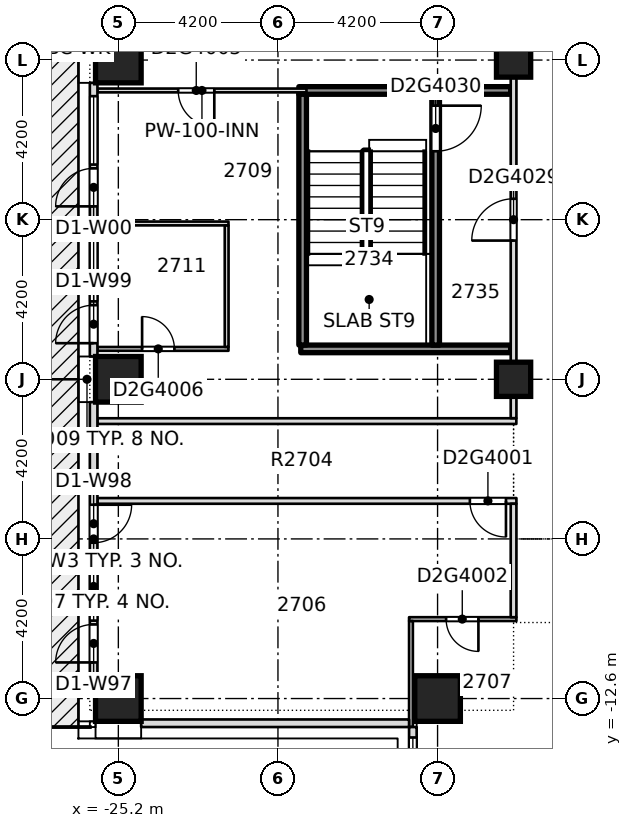
"""IFC4 building model, lengths in metres.
Left out: names, types, materials, properties, quantities, classifications, styles, units other than length and angle.
Written with IfcOpenShell. Run it as: python <this file> out.ifc"""

import sys

from ifc_helpers import new_model, si_unit, direction, frame, frame_2d, origin, origin_2d, place, context, subcontext, project, spatial, rectangle, extrude, element, fill, save


model = new_model("IFC4")
c1 = context("Model", 3, precision=1e-05, world=origin(), true_north=direction((0.0, 1.0)))
c2 = subcontext(c1, "Body", "Model", "MODEL_VIEW")
j1 = project(units=[si_unit("LENGTHUNIT", "METRE"), si_unit("PLANEANGLEUNIT", "RADIAN")], contexts=[c1])
p1 = place(None, origin())
s1 = spatial("IfcSite", under=j1, at=p1, CompositionType="ELEMENT")
p2 = place(p1, origin())
s2 = spatial("IfcBuilding", under=s1, at=p2, CompositionType="ELEMENT")
p3 = place(p2, frame((0.0, 0.0, 108.0)))
s3 = spatial("IfcBuildingStorey", under=s2, at=p3, CompositionType="ELEMENT", Elevation=108.0)
for number, where, z_axis, x_axis in (
    (1, (-25.2, -12.6, -0.32), (0.0, 0.0, 1.0), (1.0, 0.0, 0.0)),
    (2, (-16.8, -12.6, -0.32), (0.0, 0.0, 1.0), (1.0, 0.0, 0.0)),
    (3, (-25.2, -4.2, -0.32), (0.0, 0.0, 1.0), (1.0, 0.0, 0.0)),
    (4, (-25.2, 4.2, -0.32), (0.0, 0.0, 1.0), (1.0, 0.0, 0.0)),
):
    element("IfcColumn", number, at=place(p3, frame(where, z_axis=z_axis, x_axis=x_axis)), inside=s3, PredefinedType="COLUMN", context=c2, shape_type="SweptSolid", body=[
        extrude(rectangle(XDim=1.2, YDim=1.2, at=origin_2d()), origin(), (0.0, 0.0, 1.0), 3.45),
    ])
for number, where, z_axis, x_axis in (
    (5, (-14.8, -4.2, -0.32), (0.0, 0.0, 1.0), (1.0, 0.0, 0.0)),
    (6, (-14.8, 4.2, -0.32), (0.0, 0.0, 1.0), (1.0, 0.0, 0.0)),
):
    element("IfcColumn", number, at=place(p3, frame(where, z_axis=z_axis, x_axis=x_axis)), inside=s3, PredefinedType="COLUMN", context=c2, shape_type="SweptSolid", body=[
        extrude(rectangle(XDim=0.9, YDim=0.9, at=origin_2d()), origin(), (0.0, 0.0, 1.0), 3.45),
    ])
p4 = place(p3, frame((-17.55, -10.51, 0.0), z_axis=(0.0, 0.0, 1.0), x_axis=(1.0, 0.0, 0.0)))
e7 = element("IfcWall", 7, at=p4, inside=s3, PredefinedType="PARTITIONING", context=c2, shape_type="SweptSolid", body=[
    extrude(rectangle(XDim=2.825, YDim=0.1, at=frame_2d((1.413, 0.0))), origin(), (0.0, 0.0, 1.0), 3.13),
])
p5 = place(p4, frame((0.975, 0.0, 0.0)))
e8 = element("IfcOpeningElement", 8, at=p5, cuts=e7, PredefinedType="OPENING", context=c2, shape_type="SweptSolid", body=[
    extrude(rectangle(XDim=0.85, YDim=2.1, at=frame_2d((0.425, 1.05))), frame((0.0, 0.06, 0.0), z_axis=(0.0, -1.0, 0.0), x_axis=(1.0, 0.0, 0.0)), (0.0, 0.0, 1.0), 0.12),
])
p6 = place(p3, frame((-25.75, -7.4, 0.0), z_axis=(0.0, 0.0, 1.0), x_axis=(1.0, 0.0, 0.0)))
e9 = element("IfcWall", 9, at=p6, inside=s3, PredefinedType="PARTITIONING", context=c2, shape_type="SweptSolid", body=[
    extrude(rectangle(XDim=11.025, YDim=0.15, at=frame_2d((5.512, 0.0))), origin(), (0.0, 0.0, 1.0), 3.13),
])
p7 = place(p6, frame((9.8, 0.0, 0.0)))
e10 = element("IfcOpeningElement", 10, at=p7, cuts=e9, PredefinedType="OPENING", context=c2, shape_type="SweptSolid", body=[
    extrude(rectangle(XDim=0.95, YDim=2.1, at=frame_2d((0.475, 1.05))), frame((0.0, 0.085, 0.0), z_axis=(0.0, -1.0, 0.0), x_axis=(1.0, 0.0, 0.0)), (0.0, 0.0, 1.0), 0.17),
])
p8 = place(p3, frame((-25.75, -5.3, 0.0), z_axis=(0.0, 0.0, 1.0), x_axis=(1.0, 0.0, 0.0)))
e11 = element("IfcWall", 11, at=p8, inside=s3, PredefinedType="PARTITIONING", context=c2, shape_type="SweptSolid", body=[
    extrude(rectangle(XDim=11.023, YDim=0.15, at=frame_2d((5.511, 0.0))), origin(), (0.0, 0.0, 1.0), 3.13),
])
p9 = place(p3, frame((-25.75, -3.4, 0.0), z_axis=(0.0, 0.0, 1.0), x_axis=(1.0, 0.0, 0.0)))
e12 = element("IfcWall", 12, at=p9, inside=s3, PredefinedType="PARTITIONING", context=c2, shape_type="SweptSolid", body=[
    extrude(rectangle(XDim=3.448, YDim=0.1, at=frame_2d((1.724, 0.0))), origin(), (0.0, 0.0, 1.0), 3.13),
])
p10 = place(p9, frame((1.175, 0.0, 0.0)))
e13 = element("IfcOpeningElement", 13, at=p10, cuts=e12, PredefinedType="OPENING", context=c2, shape_type="SweptSolid", body=[
    extrude(rectangle(XDim=0.85, YDim=2.1, at=frame_2d((0.425, 1.05))), frame((0.0, 0.06, 0.0), z_axis=(0.0, -1.0, 0.0), x_axis=(1.0, 0.0, 0.0)), (0.0, 0.0, 1.0), 0.12),
])
p11 = place(p3, frame((-20.4, -3.4, 0.0), z_axis=(0.0, 0.0, 1.0), x_axis=(1.0, 0.0, 0.0)))
e14 = element("IfcWall", 14, at=p11, inside=s3, PredefinedType="SOLIDWALL", context=c2, shape_type="SweptSolid", body=[
    extrude(rectangle(XDim=5.523, YDim=0.2, at=frame_2d((2.761, 0.0))), origin(), (0.0, 0.0, 1.0), 3.13),
])
p12 = place(p3, frame((-25.75, -0.1, 0.0), z_axis=(0.0, 0.0, 1.0), x_axis=(1.0, 0.0, 0.0)))
e15 = element("IfcWall", 15, at=p12, inside=s3, PredefinedType="PARTITIONING", context=c2, shape_type="SweptSolid", body=[
    extrude(rectangle(XDim=3.448, YDim=0.1, at=frame_2d((1.724, 0.0))), origin(), (0.0, 0.0, 1.0), 3.13),
])
p13 = place(p3, frame((-25.75, 3.4, 0.0), z_axis=(0.0, 0.0, 1.0), x_axis=(1.0, 0.0, 0.0)))
e16 = element("IfcWall", 16, at=p13, inside=s3, PredefinedType="PARTITIONING", context=c2, shape_type="SweptSolid", body=[
    extrude(rectangle(XDim=5.5, YDim=0.1, at=frame_2d((2.75, 0.0))), origin(), (0.0, 0.0, 1.0), 3.13),
])
p14 = place(p13, frame((2.125, 0.0, 0.0)))
e17 = element("IfcOpeningElement", 17, at=p14, cuts=e16, PredefinedType="OPENING", context=c2, shape_type="SweptSolid", body=[
    extrude(rectangle(XDim=0.95, YDim=2.1, at=frame_2d((0.475, 1.05))), frame((0.0, 0.06, 0.0), z_axis=(0.0, -1.0, 0.0), x_axis=(1.0, 0.0, 0.0)), (0.0, 0.0, 1.0), 0.12),
])
p15 = place(p3, frame((-20.45, 3.4, 0.0), z_axis=(0.0, 0.0, 1.0), x_axis=(1.0, 0.0, 0.0)))
e18 = element("IfcWall", 18, at=p15, inside=s3, PredefinedType="SOLIDWALL", context=c2, shape_type="SweptSolid", body=[
    extrude(rectangle(XDim=5.575, YDim=0.2, at=frame_2d((2.788, 0.0))), origin(), (0.0, 0.0, 1.0), 3.13),
])
p16 = place(p3, frame((-22.35, -3.348, 0.0), z_axis=(0.0, 0.0, 1.0), x_axis=(0.0, 1.0, 0.0)))
e19 = element("IfcWall", 19, at=p16, inside=s3, PredefinedType="PARTITIONING", context=c2, shape_type="SweptSolid", body=[
    extrude(rectangle(XDim=3.196, YDim=0.1, at=frame_2d((1.598, 0.0))), origin(), (0.0, 0.0, 1.0), 3.13),
])
p17 = place(p3, frame((-17.5, -13.35, 0.0), z_axis=(0.0, 0.0, 1.0), x_axis=(0.0, 1.0, 0.0)))
e20 = element("IfcWall", 20, at=p17, inside=s3, PredefinedType="PARTITIONING", context=c2, shape_type="SweptSolid", body=[
    extrude(rectangle(XDim=2.79, YDim=0.1, at=frame_2d((1.395, 0.0))), origin(), (0.0, 0.0, 1.0), 3.13),
])
p18 = place(p3, frame((-16.85, -3.3, 0.0), z_axis=(0.0, 0.0, 1.0), x_axis=(0.0, 1.0, 0.0)))
e21 = element("IfcWall", 21, at=p18, inside=s3, PredefinedType="SOLIDWALL", context=c2, shape_type="SweptSolid", body=[
    extrude(rectangle(XDim=6.6, YDim=0.2, at=frame_2d((3.3, 0.0))), origin(), (0.0, 0.0, 1.0), 3.13),
])
p19 = place(p18, frame((5.1, 0.0, 0.0)))
e22 = element("IfcOpeningElement", 22, at=p19, cuts=e21, PredefinedType="OPENING", context=c2, shape_type="SweptSolid", body=[
    extrude(rectangle(XDim=1.2, YDim=2.1, at=frame_2d((0.6, 1.05))), frame((0.0, 0.11, 0.0), z_axis=(0.0, -1.0, 0.0), x_axis=(1.0, 0.0, 0.0)), (0.0, 0.0, 1.0), 0.22),
])
p20 = place(p3, frame((-14.8, -10.46, 0.0), z_axis=(0.0, 0.0, 1.0), x_axis=(0.0, 1.0, 0.0)))
e23 = element("IfcWall", 23, at=p20, inside=s3, PredefinedType="PARTITIONING", context=c2, shape_type="SweptSolid", body=[
    extrude(rectangle(XDim=2.985, YDim=0.15, at=frame_2d((1.492, 0.0))), origin(), (0.0, 0.0, 1.0), 3.13),
])
p21 = place(p3, frame((-14.8, -5.223, 0.0), z_axis=(0.0, 0.0, 1.0), x_axis=(0.0, 1.0, 0.0)))
e24 = element("IfcWall", 24, at=p21, inside=s3, PredefinedType="PARTITIONING", context=c2, shape_type="SweptSolid", body=[
    extrude(rectangle(XDim=18.523, YDim=0.15, at=frame_2d((9.261, 0.0))), origin(), (0.0, 0.0, 1.0), 3.13),
])
p22 = place(p21, frame((13.098, 0.0, 0.0)))
e25 = element("IfcOpeningElement", 25, at=p22, cuts=e24, PredefinedType="OPENING", context=c2, shape_type="SweptSolid", body=[
    extrude(rectangle(XDim=1.0, YDim=2.1, at=frame_2d((0.5, 1.05))), frame((0.0, 0.085, 0.0), z_axis=(0.0, -1.0, 0.0), x_axis=(1.0, 0.0, 0.0)), (0.0, 0.0, 1.0), 0.17),
])
p23 = place(p21, frame((4.673, 0.0, 0.0)))
e26 = element("IfcOpeningElement", 26, at=p23, cuts=e24, PredefinedType="OPENING", context=c2, shape_type="SweptSolid", body=[
    extrude(rectangle(XDim=1.1, YDim=2.1, at=frame_2d((0.55, 1.05))), frame((0.0, 0.085, 0.0), z_axis=(0.0, -1.0, 0.0), x_axis=(1.0, 0.0, 0.0)), (0.0, 0.0, 1.0), 0.17),
])
p24 = place(p3, frame((-25.85, 3.6, 0.0), z_axis=(0.0, 0.0, 1.0), x_axis=(0.0, -1.0, 0.0)))
e27 = element("IfcWall", 27, at=p24, inside=s3, PredefinedType="STANDARD", context=c2, shape_type="SweptSolid", body=[
    extrude(rectangle(XDim=7.2, YDim=0.2, at=frame_2d((3.6, 0.0))), origin(), (0.0, 0.0, 1.0), 3.13),
])
p25 = place(p24, frame((3.95, 0.0, 0.2)))
e28 = element("IfcOpeningElement", 28, at=p25, cuts=e27, PredefinedType="OPENING", context=c2, shape_type="SweptSolid", body=[
    extrude(rectangle(XDim=1.8, YDim=2.65, at=frame_2d((0.9, 1.325))), frame((0.0, 0.11, 0.0), z_axis=(0.0, -1.0, 0.0), x_axis=(1.0, 0.0, 0.0)), (0.0, 0.0, 1.0), 0.22),
])
p26 = place(p24, frame((5.85, 0.0, 0.0)))
e29 = element("IfcOpeningElement", 29, at=p26, cuts=e27, PredefinedType="OPENING", context=c2, shape_type="SweptSolid", body=[
    extrude(rectangle(XDim=1.0, YDim=2.4, at=frame_2d((0.5, 1.2))), frame((0.0, 0.11, 0.0), z_axis=(0.0, -1.0, 0.0), x_axis=(1.0, 0.0, 0.0)), (0.0, 0.0, 1.0), 0.22),
])
p27 = place(p24, frame((0.35, 0.0, 0.2)))
e30 = element("IfcOpeningElement", 30, at=p27, cuts=e27, PredefinedType="OPENING", context=c2, shape_type="SweptSolid", body=[
    extrude(rectangle(XDim=1.8, YDim=2.65, at=frame_2d((0.9, 1.325))), frame((0.0, 0.11, 0.0), z_axis=(0.0, -1.0, 0.0), x_axis=(1.0, 0.0, 0.0)), (0.0, 0.0, 1.0), 0.22),
])
p28 = place(p24, frame((2.25, 0.0, 0.0)))
e31 = element("IfcOpeningElement", 31, at=p28, cuts=e27, PredefinedType="OPENING", context=c2, shape_type="SweptSolid", body=[
    extrude(rectangle(XDim=1.0, YDim=2.4, at=frame_2d((0.5, 1.2))), frame((0.0, 0.11, 0.0), z_axis=(0.0, -1.0, 0.0), x_axis=(1.0, 0.0, 0.0)), (0.0, 0.0, 1.0), 0.22),
])
p29 = place(p3, frame((-25.85, -4.8, 0.0), z_axis=(0.0, 0.0, 1.0), x_axis=(0.0, -1.0, 0.0)))
e32 = element("IfcWall", 32, at=p29, inside=s3, PredefinedType="STANDARD", context=c2, shape_type="SweptSolid", body=[
    extrude(rectangle(XDim=7.2, YDim=0.2, at=frame_2d((3.6, 0.0))), origin(), (0.0, 0.0, 1.0), 3.13),
])
p30 = place(p29, frame((3.95, 0.0, 0.2)))
e33 = element("IfcOpeningElement", 33, at=p30, cuts=e32, PredefinedType="OPENING", context=c2, shape_type="SweptSolid", body=[
    extrude(rectangle(XDim=1.8, YDim=2.65, at=frame_2d((0.9, 1.325))), frame((0.0, 0.11, 0.0), z_axis=(0.0, -1.0, 0.0), x_axis=(1.0, 0.0, 0.0)), (0.0, 0.0, 1.0), 0.22),
])
p31 = place(p29, frame((5.85, 0.0, 0.0)))
e34 = element("IfcOpeningElement", 34, at=p31, cuts=e32, PredefinedType="OPENING", context=c2, shape_type="SweptSolid", body=[
    extrude(rectangle(XDim=1.0, YDim=2.4, at=frame_2d((0.5, 1.2))), frame((0.0, 0.11, 0.0), z_axis=(0.0, -1.0, 0.0), x_axis=(1.0, 0.0, 0.0)), (0.0, 0.0, 1.0), 0.22),
])
p32 = place(p29, frame((2.7, 0.0, 0.0)))
e35 = element("IfcOpeningElement", 35, at=p32, cuts=e32, PredefinedType="OPENING", context=c2, shape_type="SweptSolid", body=[
    extrude(rectangle(XDim=1.0, YDim=2.4, at=frame_2d((0.5, 1.2))), frame((0.0, 0.11, 0.0), z_axis=(0.0, -1.0, 0.0), x_axis=(1.0, 0.0, 0.0)), (0.0, 0.0, 1.0), 0.22),
])
p33 = place(p3, frame((-24.6, -13.25, 0.0), z_axis=(0.0, 0.0, 1.0), x_axis=(1.0, 0.0, 0.0)))
e36 = element("IfcWall", 36, at=p33, inside=s3, PredefinedType="STANDARD", context=c2, shape_type="SweptSolid", body=[
    extrude(rectangle(XDim=7.05, YDim=0.2, at=frame_2d((3.525, 0.0))), origin(), (0.0, 0.0, 1.0), 3.13),
])
p34 = place(p3, frame((-17.45, -13.35, 0.0), z_axis=(0.0, 0.0, 1.0), x_axis=(0.0, -1.0, 0.0)))
e37 = element("IfcWall", 37, at=p34, inside=s3, PredefinedType="STANDARD", context=c2, shape_type="SweptSolid", body=[
    extrude(rectangle(XDim=7.05, YDim=0.2, at=frame_2d((3.525, 0.0))), origin(), (0.0, 0.0, 1.0), 3.13),
])
p35 = place(p34, frame((3.8, 0.0, 0.2)))
e38 = element("IfcOpeningElement", 38, at=p35, cuts=e37, PredefinedType="OPENING", context=c2, shape_type="SweptSolid", body=[
    extrude(rectangle(XDim=1.8, YDim=2.65, at=frame_2d((0.9, 1.325))), frame((0.0, 0.11, 0.0), z_axis=(0.0, -1.0, 0.0), x_axis=(1.0, 0.0, 0.0)), (0.0, 0.0, 1.0), 0.22),
])
p36 = place(p34, frame((0.275, 0.0, 0.2)))
e39 = element("IfcOpeningElement", 39, at=p36, cuts=e37, PredefinedType="OPENING", context=c2, shape_type="SweptSolid", body=[
    extrude(rectangle(XDim=1.8, YDim=2.65, at=frame_2d((0.9, 1.325))), frame((0.0, 0.11, 0.0), z_axis=(0.0, -1.0, 0.0), x_axis=(1.0, 0.0, 0.0)), (0.0, 0.0, 1.0), 0.22),
])
p37 = place(p3, frame((-20.35, -3.298, 0.0), z_axis=(0.0, 0.0, 1.0), x_axis=(0.0, 1.0, 0.0)))
e40 = element("IfcWall", 40, at=p37, inside=s3, PredefinedType="SOLIDWALL", context=c2, shape_type="SweptSolid", body=[
    extrude(rectangle(XDim=6.598, YDim=0.2, at=frame_2d((3.299, 0.0))), origin(), (0.0, 0.0, 1.0), 3.13),
])
p38 = place(p7, origin())
e41 = element("IfcDoor", 41, at=p38, inside=s3, OperationType="SINGLE_SWING_RIGHT", PredefinedType="DOOR", context=c2, shape_type="SweptSolid", body=[
    extrude(rectangle(XDim=0.95, YDim=2.1, at=frame_2d((0.475, 1.05))), frame((0.0, 0.025, 0.0), z_axis=(0.0, -1.0, 0.0), x_axis=(1.0, 0.0, 0.0)), (0.0, 0.0, 1.0), 0.05),
])
fill(e10, e41)
p39 = place(p5, origin())
e42 = element("IfcDoor", 42, at=p39, inside=s3, OperationType="SINGLE_SWING_RIGHT", PredefinedType="DOOR", context=c2, shape_type="SweptSolid", body=[
    extrude(rectangle(XDim=0.85, YDim=2.1, at=frame_2d((0.425, 1.05))), frame((0.0, 0.025, 0.0), z_axis=(0.0, -1.0, 0.0), x_axis=(1.0, 0.0, 0.0)), (0.0, 0.0, 1.0), 0.05),
])
fill(e8, e42)
p40 = place(p14, origin())
e43 = element("IfcDoor", 43, at=p40, inside=s3, OperationType="SINGLE_SWING_LEFT", PredefinedType="DOOR", context=c2, shape_type="SweptSolid", body=[
    extrude(rectangle(XDim=0.95, YDim=2.1, at=frame_2d((0.475, 1.05))), frame((0.0, 0.025, 0.0), z_axis=(0.0, -1.0, 0.0), x_axis=(1.0, 0.0, 0.0)), (0.0, 0.0, 1.0), 0.05),
])
fill(e17, e43)
p41 = place(p10, origin())
e44 = element("IfcDoor", 44, at=p41, inside=s3, OperationType="SINGLE_SWING_LEFT", PredefinedType="DOOR", context=c2, shape_type="SweptSolid", body=[
    extrude(rectangle(XDim=0.85, YDim=2.1, at=frame_2d((0.425, 1.05))), frame((0.0, 0.025, 0.0), z_axis=(0.0, -1.0, 0.0), x_axis=(1.0, 0.0, 0.0)), (0.0, 0.0, 1.0), 0.05),
])
fill(e13, e44)
p42 = place(p23, origin())
e45 = element("IfcDoor", 45, at=p42, inside=s3, OperationType="SINGLE_SWING_LEFT", PredefinedType="DOOR", context=c2, shape_type="SweptSolid", body=[
    extrude(rectangle(XDim=1.1, YDim=2.1, at=frame_2d((0.55, 1.05))), frame((0.0, 0.025, 0.0), z_axis=(0.0, -1.0, 0.0), x_axis=(1.0, 0.0, 0.0)), (0.0, 0.0, 1.0), 0.05),
])
fill(e26, e45)
p43 = place(p19, origin())
e46 = element("IfcDoor", 46, at=p43, inside=s3, OperationType="SINGLE_SWING_RIGHT", PredefinedType="DOOR", context=c2, shape_type="SweptSolid", body=[
    extrude(rectangle(XDim=1.2, YDim=2.1, at=frame_2d((0.6, 1.05))), frame((0.0, 0.025, 0.0), z_axis=(0.0, -1.0, 0.0), x_axis=(1.0, 0.0, 0.0)), (0.0, 0.0, 1.0), 0.05),
])
fill(e22, e46)
p44 = place(p25, origin())
e47 = element("IfcWindow", 47, at=p44, inside=s3, PartitioningType="SINGLE_PANEL", PredefinedType="WINDOW", context=c2, shape_type="SweptSolid", body=[
    extrude(rectangle(XDim=1.8, YDim=2.65, at=frame_2d((0.9, 1.325))), frame((0.0, 0.03, 0.0), z_axis=(0.0, -1.0, 0.0), x_axis=(1.0, 0.0, 0.0)), (0.0, 0.0, 1.0), 0.06),
])
fill(e28, e47)
p45 = place(p26, origin())
e48 = element("IfcDoor", 48, at=p45, inside=s3, OperationType="SINGLE_SWING_LEFT", PredefinedType="DOOR", context=c2, shape_type="SweptSolid", body=[
    extrude(rectangle(XDim=1.0, YDim=2.4, at=frame_2d((0.5, 1.2))), frame((0.0, 0.025, 0.0), z_axis=(0.0, -1.0, 0.0), x_axis=(1.0, 0.0, 0.0)), (0.0, 0.0, 1.0), 0.05),
])
fill(e29, e48)
p46 = place(p27, origin())
e49 = element("IfcWindow", 49, at=p46, inside=s3, PartitioningType="SINGLE_PANEL", PredefinedType="WINDOW", context=c2, shape_type="SweptSolid", body=[
    extrude(rectangle(XDim=1.8, YDim=2.65, at=frame_2d((0.9, 1.325))), frame((0.0, 0.03, 0.0), z_axis=(0.0, -1.0, 0.0), x_axis=(1.0, 0.0, 0.0)), (0.0, 0.0, 1.0), 0.06),
])
fill(e30, e49)
p47 = place(p28, origin())
e50 = element("IfcDoor", 50, at=p47, inside=s3, OperationType="SINGLE_SWING_LEFT", PredefinedType="DOOR", context=c2, shape_type="SweptSolid", body=[
    extrude(rectangle(XDim=1.0, YDim=2.4, at=frame_2d((0.5, 1.2))), frame((0.0, 0.025, 0.0), z_axis=(0.0, -1.0, 0.0), x_axis=(1.0, 0.0, 0.0)), (0.0, 0.0, 1.0), 0.05),
])
fill(e31, e50)
p48 = place(p30, origin())
e51 = element("IfcWindow", 51, at=p48, inside=s3, PartitioningType="SINGLE_PANEL", PredefinedType="WINDOW", context=c2, shape_type="SweptSolid", body=[
    extrude(rectangle(XDim=1.8, YDim=2.65, at=frame_2d((0.9, 1.325))), frame((0.0, 0.03, 0.0), z_axis=(0.0, -1.0, 0.0), x_axis=(1.0, 0.0, 0.0)), (0.0, 0.0, 1.0), 0.06),
])
fill(e33, e51)
p49 = place(p31, origin())
e52 = element("IfcDoor", 52, at=p49, inside=s3, OperationType="SINGLE_SWING_LEFT", PredefinedType="DOOR", context=c2, shape_type="SweptSolid", body=[
    extrude(rectangle(XDim=1.0, YDim=2.4, at=frame_2d((0.5, 1.2))), frame((0.0, 0.025, 0.0), z_axis=(0.0, -1.0, 0.0), x_axis=(1.0, 0.0, 0.0)), (0.0, 0.0, 1.0), 0.05),
])
fill(e34, e52)
p50 = place(p32, origin())
e53 = element("IfcDoor", 53, at=p50, inside=s3, OperationType="SINGLE_SWING_LEFT", PredefinedType="DOOR", context=c2, shape_type="SweptSolid", body=[
    extrude(rectangle(XDim=1.0, YDim=2.4, at=frame_2d((0.5, 1.2))), frame((0.0, 0.025, 0.0), z_axis=(0.0, -1.0, 0.0), x_axis=(1.0, 0.0, 0.0)), (0.0, 0.0, 1.0), 0.05),
])
fill(e35, e53)
p51 = place(p36, origin())
e54 = element("IfcWindow", 54, at=p51, inside=s3, PartitioningType="SINGLE_PANEL", PredefinedType="WINDOW", context=c2, shape_type="SweptSolid", body=[
    extrude(rectangle(XDim=1.8, YDim=2.65, at=frame_2d((0.9, 1.325))), frame((0.0, 0.03, 0.0), z_axis=(0.0, -1.0, 0.0), x_axis=(1.0, 0.0, 0.0)), (0.0, 0.0, 1.0), 0.06),
])
fill(e39, e54)
save(model, sys.argv[1])
